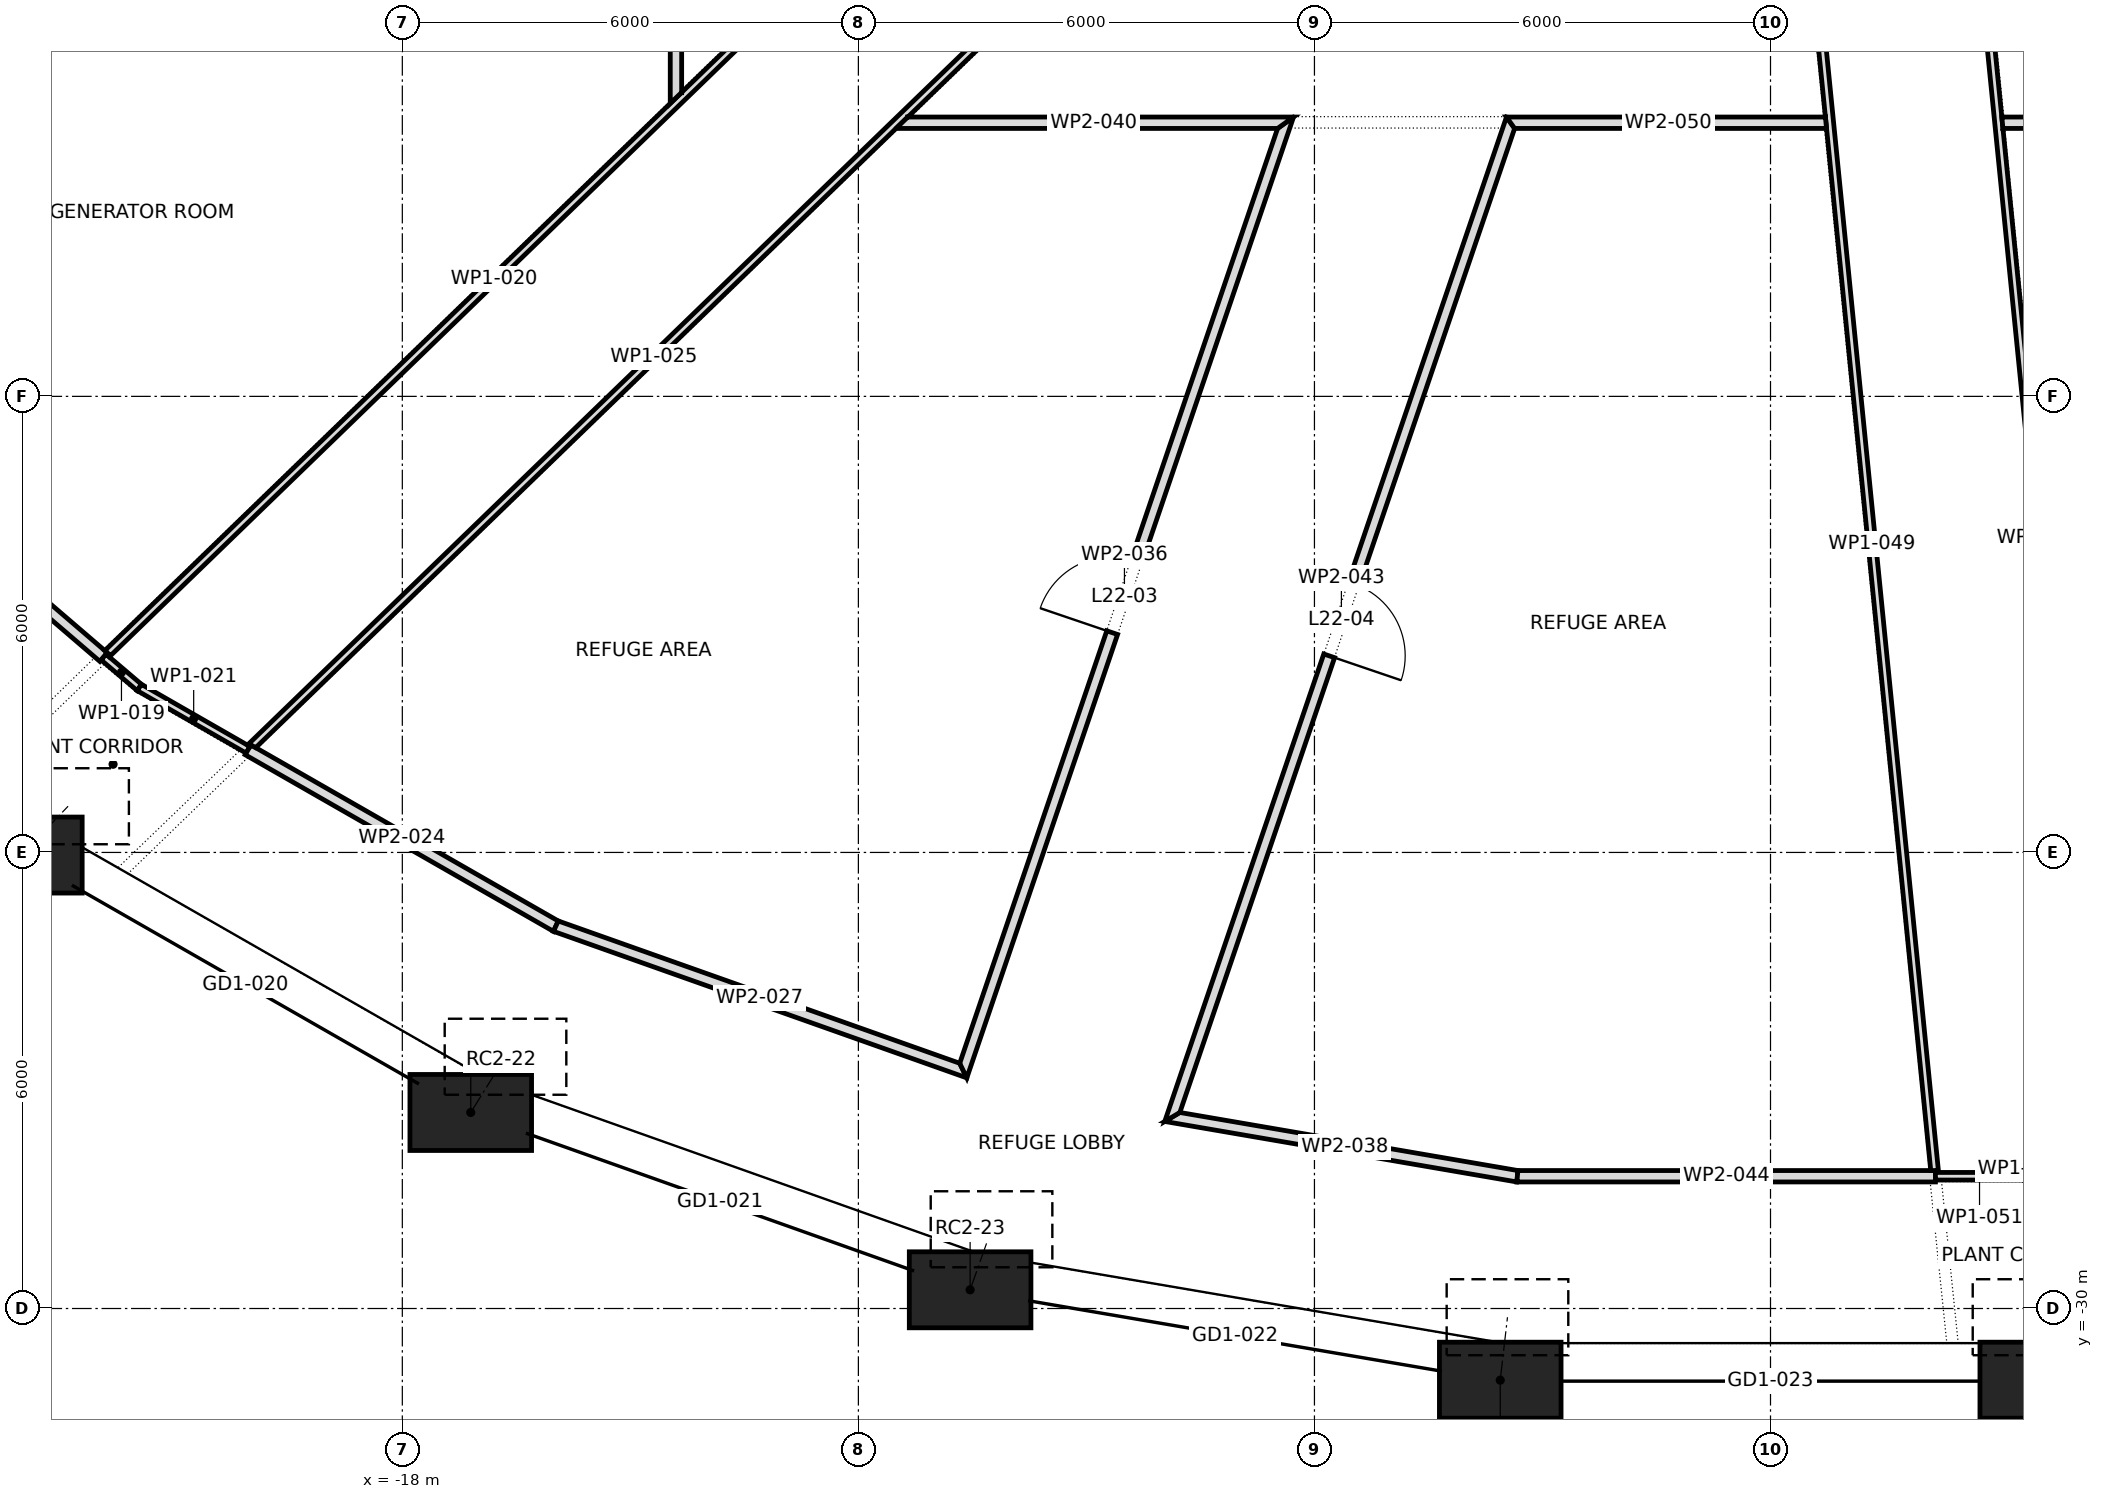
"""IFC4 building model, lengths in metres.
Left out: names, types, materials, properties, quantities, classifications, styles, units other than length and angle.
Written with IfcOpenShell. Run it as: python <this file> out.ifc"""

import sys

from ifc_helpers import new_model, si_unit, direction, frame, frame_2d, origin, origin_2d, place, context, subcontext, project, spatial, polyline, rectangle, outline, extrude, element, fill, save


model = new_model("IFC4")
c1 = context("Model", 3, precision=1e-05, world=origin(), true_north=direction((0.0, 1.0)))
c2 = subcontext(c1, "Body", "Model", "MODEL_VIEW")
j1 = project(units=[si_unit("LENGTHUNIT", "METRE"), si_unit("PLANEANGLEUNIT", "RADIAN")], contexts=[c1])
p1 = place(None, origin())
s1 = spatial("IfcSite", under=j1, at=p1, CompositionType="ELEMENT")
p2 = place(p1, origin())
s2 = spatial("IfcBuilding", under=s1, at=p2, CompositionType="ELEMENT")
p3 = place(p2, frame((0.0, 0.0, 99.1)))
s3 = spatial("IfcBuildingStorey", under=s2, at=p3, CompositionType="ELEMENT", Elevation=99.1)
p4 = place(p3, frame((-23.012, -24.034, 0.083), z_axis=(0.115812481815, 0.12096379157, 0.985877898213), x_axis=(-0.722319686129, 0.691559304059, 0.0)))
e1 = element("IfcColumn", 1, at=p4, inside=s3, PredefinedType="COLUMN", context=c2, shape_type="SweptSolid", body=[
    extrude(rectangle(XDim=1.6, YDim=1.0, at=origin_2d()), origin(), (0.0, 0.0, 1.0), 5.308),
])
p5 = place(p3, frame((-17.1, -27.421, 0.081), z_axis=(0.08609317292, 0.138107798226, 0.986668232815), x_axis=(-0.848616882571, 0.529007926798, 0.0)))
e2 = element("IfcColumn", 2, at=p5, inside=s3, PredefinedType="COLUMN", context=c2, shape_type="SweptSolid", body=[
    extrude(rectangle(XDim=1.6, YDim=1.0, at=origin_2d()), origin(), (0.0, 0.0, 1.0), 5.309),
])
p6 = place(p3, frame((-10.53, -29.754, 0.079), z_axis=(0.053064720362, 0.149997502446, 0.987261305184), x_axis=(-0.942744642547, 0.333515425352, 0.0)))
e3 = element("IfcColumn", 3, at=p6, inside=s3, PredefinedType="COLUMN", context=c2, shape_type="SweptSolid", body=[
    extrude(rectangle(XDim=1.6, YDim=1.0, at=origin_2d()), origin(), (0.0, 0.0, 1.0), 5.309),
])
for number, where, z_axis, x_axis in (
    (4, (-3.556, -30.943, 0.078), (0.018, 0.156, 0.988), (-0.993, 0.114, 0.0)),
    (5, (3.556, -30.943, 0.078), (-0.018, 0.156, 0.988), (-0.993, -0.114, 0.0)),
):
    element("IfcColumn", number, at=place(p3, frame(where, z_axis=z_axis, x_axis=x_axis)), inside=s3, PredefinedType="COLUMN", context=c2, shape_type="SweptSolid", body=[
        extrude(rectangle(XDim=1.6, YDim=1.0, at=origin_2d()), origin(), (0.0, 0.0, 1.0), 5.31),
    ])
p7 = place(p3, frame((-26.096, -17.855, 0.0), z_axis=(0.0, 0.0, 1.0), x_axis=(0.758892304341, -0.651216147229, 0.0)))
e6 = element("IfcWall", 6, at=p7, inside=s3, PredefinedType="PARTITIONING", context=c2, shape_type="SweptSolid", body=[
    extrude(outline(polyline([(5.489, 0.075), (3.665, 0.075), (1.84, 0.075), (0.015, 0.075), (0.0, -0.075), (0.0, -0.075), (1.83, -0.075), (3.659, -0.075), (5.489, -0.075), (5.489, 0.075)])), origin(), (0.0, 0.0, 1.0), 5.1),
])
p8 = place(p3, frame((-21.93, -21.43, 0.0), z_axis=(0.0, 0.0, 1.0), x_axis=(0.761386795388, -0.648297885088, 0.0)))
e7 = element("IfcWall", 7, at=p8, inside=s3, PredefinedType="PARTITIONING", context=c2, shape_type="SweptSolid", body=[
    extrude(outline(polyline([(0.0, -0.05), (0.622, -0.05), (0.613, 0.05), (0.0, 0.05), (0.0, -0.05)])), origin(), (0.0, 0.0, 1.0), 5.1),
])
p9 = place(p3, frame((-21.89, -21.391, 0.0), z_axis=(0.0, 0.0, 1.0), x_axis=(0.718607137454, 0.695416265269, 0.0)))
e8 = element("IfcWall", 8, at=p9, inside=s3, PredefinedType="PARTITIONING", context=c2, shape_type="SweptSolid", body=[
    extrude(outline(polyline([(14.18, 0.05), (12.378, 0.05), (10.576, 0.05), (10.573, 0.047), (10.57, 0.05), (8.811, 0.05), (7.052, 0.05), (5.292, 0.05), (3.533, 0.05), (1.774, 0.05), (0.015, 0.05), (0.019, 0.007), (0.0, 0.005), (0.0, -0.05), (1.772, -0.05), (3.545, -0.05), (5.318, -0.05), (7.09, -0.05), (8.863, -0.05), (10.635, -0.05), (12.408, -0.05), (14.18, -0.05), (14.18, 0.05)])), origin(), (0.0, 0.0, 1.0), 5.1),
])
p10 = place(p3, frame((-21.464, -21.828, 0.0), z_axis=(0.0, 0.0, 1.0), x_axis=(0.867515133923, -0.497410788398, 0.0)))
e9 = element("IfcWall", 9, at=p10, inside=s3, PredefinedType="PARTITIONING", context=c2, shape_type="SweptSolid", body=[
    extrude(outline(polyline([(1.653, 0.05), (0.009, 0.05), (0.0, -0.05), (1.653, -0.05), (1.653, 0.05)])), origin(), (0.0, 0.0, 1.0), 5.1),
])
p11 = place(p3, frame((-20.03, -22.65, 0.0), z_axis=(0.0, 0.0, 1.0), x_axis=(0.867705864806, -0.497077994062, 0.0)))
e10 = element("IfcWall", 10, at=p11, inside=s3, PredefinedType="PARTITIONING", context=c2, shape_type="SweptSolid", body=[
    extrude(outline(polyline([(0.0, -0.075), (1.558, -0.075), (3.116, -0.075), (4.674, -0.075), (4.661, 0.075), (3.107, 0.075), (1.553, 0.075), (0.0, 0.075), (0.0, -0.075)])), origin(), (0.0, 0.0, 1.0), 5.1),
])
p12 = place(p3, frame((-20.003, -22.624, 0.0), z_axis=(0.0, 0.0, 1.0), x_axis=(0.718850780889, 0.695164408478, 0.0)))
e11 = element("IfcWall", 11, at=p12, inside=s3, PredefinedType="PARTITIONING", context=c2, shape_type="SweptSolid", body=[
    extrude(outline(polyline([(0.054, -0.05), (2.043, -0.05), (4.031, -0.05), (6.02, -0.05), (8.008, -0.05), (9.997, -0.05), (11.985, -0.05), (11.987, -0.048), (11.989, -0.05), (13.369, -0.05), (14.75, -0.05), (14.75, 0.05), (12.906, 0.05), (11.062, 0.05), (9.219, 0.05), (7.375, 0.05), (5.531, 0.05), (3.688, 0.05), (1.844, 0.05), (0.0, 0.05), (0.0, 0.049), (0.01, 0.014), (0.034, 0.021), (0.054, -0.05)])), origin(), (0.0, 0.0, 1.0), 5.1),
])
p13 = place(p3, frame((-15.986, -24.968, 0.0), z_axis=(0.0, 0.0, 1.0), x_axis=(0.94253008703, -0.334121287923, 0.0)))
e12 = element("IfcWall", 12, at=p13, inside=s3, PredefinedType="PARTITIONING", context=c2, shape_type="SweptSolid", body=[
    extrude(outline(polyline([(0.0, -0.075), (1.923, -0.075), (3.846, -0.075), (5.77, -0.075), (5.618, 0.075), (3.75, 0.075), (1.882, 0.075), (0.013, 0.075), (0.0, -0.074), (0.0, -0.075)])), origin(), (0.0, 0.0, 1.0), 5.1),
])
p14 = place(p3, frame((-14.4, -14.147, 0.0), z_axis=(0.0, 0.0, 1.0), x_axis=(0.0, 1.0, 0.0)))
e13 = element("IfcWall", 13, at=p14, inside=s3, PredefinedType="PARTITIONING", context=c2, shape_type="SweptSolid", body=[
    extrude(outline(polyline([(0.146, -0.075), (1.967, -0.075), (3.787, -0.075), (5.608, -0.075), (5.487, 0.0), (5.367, 0.075), (3.578, 0.075), (1.79, 0.075), (0.001, 0.075), (0.146, -0.075)])), origin(), (0.0, 0.0, 1.0), 5.1),
])
p15 = place(p3, frame((-14.292, -8.607, 0.0), z_axis=(0.0, 0.0, 1.0), x_axis=(-0.896913310142, -0.442206415703, 0.0)))
e14 = element("IfcWall", 14, at=p15, inside=s3, PredefinedType="PARTITIONING", context=c2, shape_type="SweptSolid", body=[
    extrude(outline(polyline([(0.0, -0.075), (1.926, -0.075), (3.853, -0.075), (5.779, -0.075), (7.705, -0.075), (9.631, -0.075), (11.557, -0.075), (13.483, -0.075), (15.409, -0.075), (15.225, 0.075), (13.352, 0.075), (11.479, 0.075), (9.606, 0.075), (7.733, 0.075), (5.86, 0.075), (3.987, 0.075), (2.114, 0.075), (0.241, 0.075), (0.0, -0.075)])), origin(), (0.0, 0.0, 1.0), 5.1),
])
p16 = place(p15, frame((7.219, 0.0, 0.0)))
e15 = element("IfcOpeningElement", 15, at=p16, cuts=e14, PredefinedType="OPENING", context=c2, shape_type="SweptSolid", body=[
    extrude(rectangle(XDim=1.0, YDim=2.1, at=frame_2d((0.5, 1.05))), frame((0.0, 0.087, 0.0), z_axis=(0.0, -1.0, 0.0), x_axis=(1.0, 0.0, 0.0)), (0.0, 0.0, 1.0), 0.174),
])
p17 = place(p3, frame((-10.645, -26.942, 0.0), z_axis=(0.0, 0.0, 1.0), x_axis=(0.321926990849, 0.946764496886, 0.0)))
e16 = element("IfcWall", 16, at=p17, inside=s3, PredefinedType="PARTITIONING", context=c2, shape_type="SweptSolid", body=[
    extrude(outline(polyline([(13.352, -0.075), (13.352, -0.075), (13.143, 0.075), (11.287, 0.075), (9.431, 0.075), (7.575, 0.075), (5.719, 0.075), (3.864, 0.075), (2.008, 0.075), (0.152, 0.075), (0.0, -0.075), (1.907, -0.075), (3.815, -0.075), (5.722, -0.075), (7.63, -0.075), (9.537, -0.075), (11.444, -0.075), (13.352, -0.075)])), origin(), (0.0, 0.0, 1.0), 5.1),
])
p18 = place(p17, frame((6.162, 0.0, 0.0)))
e17 = element("IfcOpeningElement", 17, at=p18, cuts=e16, PredefinedType="OPENING", context=c2, shape_type="SweptSolid", body=[
    extrude(rectangle(XDim=1.0, YDim=2.1, at=frame_2d((0.5, 1.05))), frame((0.0, 0.087, 0.0), z_axis=(0.0, -1.0, 0.0), x_axis=(1.0, 0.0, 0.0)), (0.0, 0.0, 1.0), 0.174),
])
p19 = place(p3, frame((-7.957, -27.465, 0.0), z_axis=(0.0, 0.0, 1.0), x_axis=(0.985561893729, -0.169315544559, 0.0)))
e18 = element("IfcWall", 18, at=p19, inside=s3, PredefinedType="PARTITIONING", context=c2, shape_type="SweptSolid", body=[
    extrude(outline(polyline([(4.701, -0.075), (4.701, -0.074), (4.688, 0.075), (3.184, 0.075), (1.68, 0.075), (0.176, 0.075), (0.0, -0.075), (1.567, -0.075), (3.134, -0.075), (4.701, -0.075)])), origin(), (0.0, 0.0, 1.0), 5.1),
])
p20 = place(p3, frame((-6.275, -14.4, 0.0), z_axis=(0.0, 0.0, 1.0), x_axis=(-1.0, 0.0, 0.0)))
e19 = element("IfcWall", 19, at=p20, inside=s3, PredefinedType="PARTITIONING", context=c2, shape_type="SweptSolid", body=[
    extrude(outline(polyline([(0.0, -0.075), (1.691, -0.075), (3.383, -0.075), (5.074, -0.075), (5.229, 0.075), (5.229, 0.075), (3.556, 0.075), (1.882, 0.075), (0.209, 0.075), (0.104, 0.0), (0.0, -0.075), (0.0, -0.075)])), origin(), (0.0, 0.0, 1.0), 5.1),
])
p21 = place(p3, frame((-3.403, -14.349, 0.0), z_axis=(0.0, 0.0, 1.0), x_axis=(-0.32208303293, -0.946711423771, 0.0)))
e20 = element("IfcWall", 20, at=p21, inside=s3, PredefinedType="PARTITIONING", context=c2, shape_type="SweptSolid", body=[
    extrude(outline(polyline([(0.0, -0.075), (1.994, -0.075), (3.988, -0.075), (5.982, -0.075), (7.976, -0.075), (9.97, -0.075), (11.964, -0.075), (13.958, -0.075), (13.782, 0.075), (11.829, 0.075), (9.875, 0.075), (7.922, 0.075), (5.968, 0.075), (4.015, 0.075), (2.061, 0.075), (0.107, 0.075), (0.0, -0.075)])), origin(), (0.0, 0.0, 1.0), 5.1),
])
p22 = place(p21, frame((6.462, 0.0, 0.0)))
e21 = element("IfcOpeningElement", 21, at=p22, cuts=e20, PredefinedType="OPENING", context=c2, shape_type="SweptSolid", body=[
    extrude(rectangle(XDim=1.0, YDim=2.1, at=frame_2d((0.5, 1.05))), frame((0.0, 0.087, 0.0), z_axis=(0.0, -1.0, 0.0), x_axis=(1.0, 0.0, 0.0)), (0.0, 0.0, 1.0), 0.174),
])
p23 = place(p3, frame((-3.336, -28.26, 0.0), z_axis=(0.0, 0.0, 1.0), x_axis=(1.0, 0.0, 0.0)))
e22 = element("IfcWall", 22, at=p23, inside=s3, PredefinedType="PARTITIONING", context=c2, shape_type="SweptSolid", body=[
    extrude(outline(polyline([(5.506, 0.075), (3.675, 0.075), (1.844, 0.075), (0.013, 0.075), (0.0, -0.075), (1.835, -0.075), (3.671, -0.075), (5.506, -0.075), (5.506, 0.075)])), origin(), (0.0, 0.0, 1.0), 5.1),
])
p24 = place(p3, frame((0.51, -11.7, 0.0), z_axis=(0.0, 0.0, 1.0), x_axis=(0.09951245757, -0.995036316316, 0.0)))
e23 = element("IfcWall", 23, at=p24, inside=s3, PredefinedType="PARTITIONING", context=c2, shape_type="SweptSolid", body=[
    extrude(outline(polyline([(0.0, -0.05), (1.317, -0.05), (2.633, -0.05), (2.633, -0.05), (2.636, -0.05), (4.625, -0.05), (6.615, -0.05), (8.604, -0.05), (10.594, -0.05), (12.583, -0.05), (14.573, -0.05), (16.562, -0.05), (16.568, 0.011), (16.593, 0.009), (16.597, 0.045), (16.597, 0.05), (14.753, 0.05), (12.909, 0.05), (11.065, 0.05), (9.22, 0.05), (7.376, 0.05), (5.532, 0.05), (3.688, 0.05), (1.844, 0.05), (0.0, 0.05), (0.0, -0.05)])), origin(), (0.0, 0.0, 1.0), 5.1),
])
p25 = place(p3, frame((0.737, -14.4, 0.0), z_axis=(0.0, 0.0, 1.0), x_axis=(-1.0, 0.0, 0.0)))
e24 = element("IfcWall", 24, at=p25, inside=s3, PredefinedType="PARTITIONING", context=c2, shape_type="SweptSolid", body=[
    extrude(outline(polyline([(4.211, -0.075), (4.211, -0.075), (4.157, 0.0), (4.104, 0.075), (2.736, 0.075), (1.368, 0.075), (0.0, 0.075), (0.0, 0.073), (0.015, -0.075), (1.413, -0.075), (2.812, -0.075), (4.211, -0.075)])), origin(), (0.0, 0.0, 1.0), 5.1),
])
p26 = place(p3, frame((2.17, -28.26, 0.0), z_axis=(0.0, 0.0, 1.0), x_axis=(1.0, 0.0, 0.0)))
e25 = element("IfcWall", 25, at=p26, inside=s3, PredefinedType="PARTITIONING", context=c2, shape_type="SweptSolid", body=[
    extrude(outline(polyline([(1.164, -0.05), (1.164, -0.049), (1.156, 0.05), (0.0, 0.05), (0.0, -0.05), (1.164, -0.05)])), origin(), (0.0, 0.0, 1.0), 5.1),
])
p27 = place(p3, frame((2.73, -11.7, 0.0), z_axis=(0.0, 0.0, 1.0), x_axis=(0.099620052523, -0.995025549991, 0.0)))
e26 = element("IfcWall", 26, at=p27, inside=s3, PredefinedType="PARTITIONING", context=c2, shape_type="SweptSolid", body=[
    extrude(outline(polyline([(16.415, -0.05), (16.415, -0.042), (16.412, -0.003), (16.415, -0.003), (16.415, -0.003), (16.387, -0.005), (16.383, 0.05), (14.442, 0.05), (12.5, 0.05), (10.559, 0.05), (8.618, 0.05), (6.677, 0.05), (4.735, 0.05), (2.794, 0.05), (2.794, 0.05), (2.788, 0.05), (1.394, 0.05), (0.0, 0.05), (0.0, -0.05), (1.824, -0.05), (3.648, -0.05), (5.472, -0.05), (7.295, -0.05), (9.119, -0.05), (10.943, -0.05), (12.767, -0.05), (14.591, -0.05), (16.415, -0.05)])), origin(), (0.0, 0.0, 1.0), 5.1),
])
p28 = place(p3, frame((6.624, -14.4, 0.0), z_axis=(0.0, 0.0, 1.0), x_axis=(-1.0, 0.0, 0.0)))
e27 = element("IfcWall", 27, at=p28, inside=s3, PredefinedType="PARTITIONING", context=c2, shape_type="SweptSolid", body=[
    extrude(outline(polyline([(3.58, -0.075), (3.58, -0.071), (3.565, 0.075), (1.826, 0.075), (0.087, 0.075), (0.043, 0.0), (0.0, -0.075), (0.0, -0.075), (1.79, -0.075), (3.58, -0.075)])), origin(), (0.0, 0.0, 1.0), 5.1),
])
p29 = place(p18, origin())
e28 = element("IfcDoor", 28, at=p29, inside=s3, OperationType="SINGLE_SWING_RIGHT", PredefinedType="DOOR", context=c2, shape_type="SweptSolid", body=[
    extrude(rectangle(XDim=1.0, YDim=2.1, at=frame_2d((0.5, 1.05))), frame((0.0, 0.025, 0.0), z_axis=(0.0, -1.0, 0.0), x_axis=(1.0, 0.0, 0.0)), (0.0, 0.0, 1.0), 0.05),
])
fill(e17, e28)
p30 = place(p22, origin())
e29 = element("IfcDoor", 29, at=p30, inside=s3, OperationType="SINGLE_SWING_LEFT", PredefinedType="DOOR", context=c2, shape_type="SweptSolid", body=[
    extrude(rectangle(XDim=1.0, YDim=2.1, at=frame_2d((0.5, 1.05))), frame((0.0, 0.025, 0.0), z_axis=(0.0, -1.0, 0.0), x_axis=(1.0, 0.0, 0.0)), (0.0, 0.0, 1.0), 0.05),
])
fill(e21, e29)
save(model, sys.argv[1])
